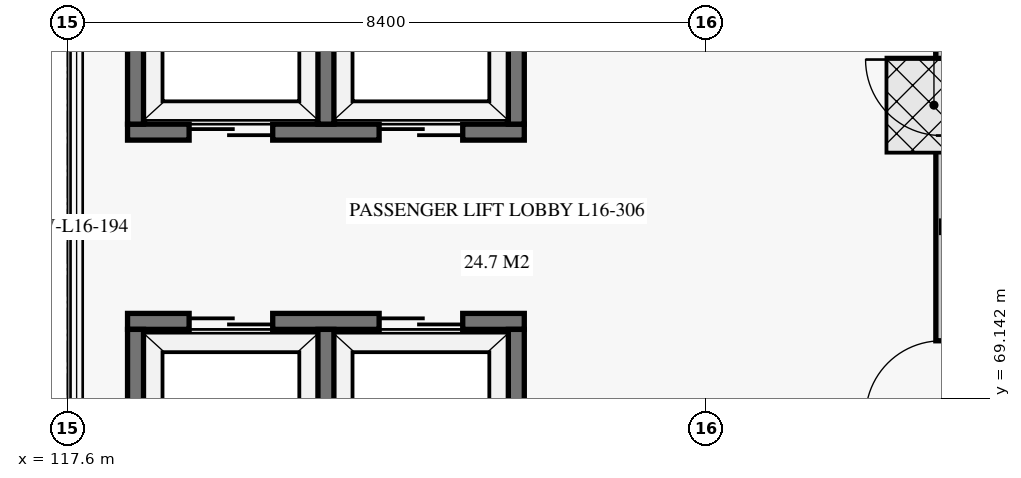
"""IFC4 building model, lengths in metres.
Left out: names, types, materials, properties, quantities, classifications, styles, units other than length and angle.
Written with IfcOpenShell. Run it as: python <this file> out.ifc"""

import sys

from ifc_helpers import new_model, si_unit, direction, frame, frame_2d, origin, origin_2d, place, context, subcontext, project, spatial, rectangle, extrude, element, fill, save


model = new_model("IFC4")
c1 = context("Model", 3, precision=1e-05, world=origin(), true_north=direction((0.0, 1.0)))
c2 = subcontext(c1, "Body", "Model", "MODEL_VIEW")
j1 = project(units=[si_unit("LENGTHUNIT", "METRE"), si_unit("PLANEANGLEUNIT", "RADIAN")], contexts=[c1])
p1 = place(None, origin())
s1 = spatial("IfcSite", under=j1, at=p1, CompositionType="ELEMENT")
p2 = place(p1, origin())
s2 = spatial("IfcBuilding", under=s1, at=p2, CompositionType="ELEMENT")
p3 = place(p2, frame((0.0, 0.0, 66.7)))
s3 = spatial("IfcBuildingStorey", under=s2, at=p3, CompositionType="ELEMENT", Elevation=66.7)
p4 = place(p3, frame((117.72, 67.366, 4.5), z_axis=(0.0, 0.0, 1.0), x_axis=(0.0, 1.0, 0.0)))
e1 = element("IfcWall", 1, at=p4, inside=s3, PredefinedType="SOLIDWALL", context=c2, shape_type="SweptSolid", body=[
    extrude(rectangle(XDim=8.104, YDim=0.23, at=frame_2d((4.052, 0.0))), origin(), (0.0, 0.0, 1.0), 3.15),
])
p5 = place(p3, frame((118.39, 70.155, 0.0), z_axis=(0.0, 0.0, 1.0), x_axis=(1.0, 0.0, 0.0)))
e2 = element("IfcWall", 2, at=p5, inside=s3, PredefinedType="SHEAR", context=c2, shape_type="SweptSolid", body=[
    extrude(rectangle(XDim=5.22, YDim=0.21, at=frame_2d((2.61, 0.0))), origin(), (0.0, 0.0, 1.0), 4.22),
])
p6 = place(p5, frame((0.81, 0.0, 0.0)))
e3 = element("IfcOpeningElement", 3, at=p6, cuts=e2, PredefinedType="OPENING", context=c2, shape_type="SweptSolid", body=[
    extrude(rectangle(XDim=1.1, YDim=2.15, at=frame_2d((0.55, 1.075))), frame((0.0, 0.115, 0.0), z_axis=(0.0, -1.0, 0.0), x_axis=(1.0, 0.0, 0.0)), (0.0, 0.0, 1.0), 0.23),
])
p7 = place(p5, frame((3.31, 0.0, 0.0)))
e4 = element("IfcOpeningElement", 4, at=p7, cuts=e2, PredefinedType="OPENING", context=c2, shape_type="SweptSolid", body=[
    extrude(rectangle(XDim=1.1, YDim=2.15, at=frame_2d((0.55, 1.075))), frame((0.0, 0.115, 0.0), z_axis=(0.0, -1.0, 0.0), x_axis=(1.0, 0.0, 0.0)), (0.0, 0.0, 1.0), 0.23),
])
for number, where, z_axis, x_axis in (
    (5, (118.495, 67.85, 0.0), (0.0, 0.0, 1.0), (0.0, 1.0, 0.0)),
    (6, (123.505, 67.85, 0.0), (0.0, 0.0, 1.0), (0.0, 1.0, 0.0)),
    (7, (121.0, 67.85, 0.0), (0.0, 0.0, 1.0), (0.0, 1.0, 0.0)),
):
    element("IfcWall", number, at=place(p3, frame(where, z_axis=z_axis, x_axis=x_axis)), inside=s3, PredefinedType="SHEAR", context=c2, shape_type="SweptSolid", body=[
        extrude(rectangle(XDim=2.2, YDim=0.21, at=frame_2d((1.1, 0.0))), origin(), (0.0, 0.0, 1.0), 4.22),
    ])
p8 = place(p3, frame((118.39, 72.645, 0.0), z_axis=(0.0, 0.0, 1.0), x_axis=(1.0, 0.0, 0.0)))
e8 = element("IfcWall", 8, at=p8, inside=s3, PredefinedType="SHEAR", context=c2, shape_type="SweptSolid", body=[
    extrude(rectangle(XDim=5.22, YDim=0.21, at=frame_2d((2.61, 0.0))), origin(), (0.0, 0.0, 1.0), 4.22),
])
p9 = place(p8, frame((0.81, 0.0, 0.0)))
e9 = element("IfcOpeningElement", 9, at=p9, cuts=e8, PredefinedType="OPENING", context=c2, shape_type="SweptSolid", body=[
    extrude(rectangle(XDim=1.1, YDim=2.15, at=frame_2d((0.55, 1.075))), frame((0.0, 0.115, 0.0), z_axis=(0.0, -1.0, 0.0), x_axis=(1.0, 0.0, 0.0)), (0.0, 0.0, 1.0), 0.23),
])
p10 = place(p8, frame((3.31, 0.0, 0.0)))
e10 = element("IfcOpeningElement", 10, at=p10, cuts=e8, PredefinedType="OPENING", context=c2, shape_type="SweptSolid", body=[
    extrude(rectangle(XDim=1.1, YDim=2.15, at=frame_2d((0.55, 1.075))), frame((0.0, 0.115, 0.0), z_axis=(0.0, -1.0, 0.0), x_axis=(1.0, 0.0, 0.0)), (0.0, 0.0, 1.0), 0.23),
])
for number, where, z_axis, x_axis in (
    (11, (118.495, 72.75, 0.0), (0.0, 0.0, 1.0), (0.0, 1.0, 0.0)),
    (12, (123.505, 72.75, 0.0), (0.0, 0.0, 1.0), (0.0, 1.0, 0.0)),
    (13, (121.0, 72.75, 0.0), (0.0, 0.0, 1.0), (0.0, 1.0, 0.0)),
):
    element("IfcWall", number, at=place(p3, frame(where, z_axis=z_axis, x_axis=x_axis)), inside=s3, PredefinedType="SHEAR", context=c2, shape_type="SweptSolid", body=[
        extrude(rectangle(XDim=2.2, YDim=0.21, at=frame_2d((1.1, 0.0))), origin(), (0.0, 0.0, 1.0), 4.22),
    ])
p11 = place(p3, frame((129.1, 67.7, 0.0), z_axis=(0.0, 0.0, 1.0), x_axis=(0.0, 1.0, 0.0)))
e14 = element("IfcWall", 14, at=p11, inside=s3, PredefinedType="PARTITIONING", context=c2, shape_type="SweptSolid", body=[
    extrude(rectangle(XDim=7.4, YDim=0.15, at=frame_2d((3.7, 0.0))), origin(), (0.0, 0.0, 1.0), 3.84),
])
p12 = place(p11, frame((1.2, 0.0, 0.0)))
e15 = element("IfcOpeningElement", 15, at=p12, cuts=e14, PredefinedType="OPENING", context=c2, shape_type="SweptSolid", body=[
    extrude(rectangle(XDim=1.0, YDim=2.1, at=frame_2d((0.5, 1.05))), frame((0.0, 0.085, 0.0), z_axis=(0.0, -1.0, 0.0), x_axis=(1.0, 0.0, 0.0)), (0.0, 0.0, 1.0), 0.17),
])
p13 = place(p11, frame((4.9, 0.0, 0.0)))
e16 = element("IfcOpeningElement", 16, at=p13, cuts=e14, PredefinedType="OPENING", context=c2, shape_type="SweptSolid", body=[
    extrude(rectangle(XDim=1.0, YDim=2.1, at=frame_2d((0.5, 1.05))), frame((0.0, 0.085, 0.0), z_axis=(0.0, -1.0, 0.0), x_axis=(1.0, 0.0, 0.0)), (0.0, 0.0, 1.0), 0.17),
])
p14 = place(p2, frame((0.0, 0.0, 74.78)))
p15 = place(p14, origin())
p16 = place(p15, frame((129.0, 73.0, 0.22)))
e17 = element("IfcDoor", 17, at=p16, inside=s3, OperationType="SINGLE_SWING_LEFT", PredefinedType="TRAPDOOR", context=c2, shape_type="SweptSolid", body=[
    extrude(rectangle(XDim=1.25, YDim=1.25, at=origin_2d()), origin(), (0.0, 0.0, 1.0), 0.05),
])
p17 = place(p6, origin())
e18 = element("IfcDoor", 18, at=p17, inside=s3, OperationType="DOUBLE_DOOR_SLIDING", PredefinedType="DOOR", context=c2, shape_type="SweptSolid", body=[
    extrude(rectangle(XDim=1.1, YDim=2.15, at=frame_2d((0.55, 1.075))), frame((0.0, 0.025, 0.0), z_axis=(0.0, -1.0, 0.0), x_axis=(1.0, 0.0, 0.0)), (0.0, 0.0, 1.0), 0.05),
])
fill(e3, e18)
p18 = place(p7, origin())
e19 = element("IfcDoor", 19, at=p18, inside=s3, OperationType="DOUBLE_DOOR_SLIDING", PredefinedType="DOOR", context=c2, shape_type="SweptSolid", body=[
    extrude(rectangle(XDim=1.1, YDim=2.15, at=frame_2d((0.55, 1.075))), frame((0.0, 0.025, 0.0), z_axis=(0.0, -1.0, 0.0), x_axis=(1.0, 0.0, 0.0)), (0.0, 0.0, 1.0), 0.05),
])
fill(e4, e19)
p19 = place(p9, origin())
e20 = element("IfcDoor", 20, at=p19, inside=s3, OperationType="DOUBLE_DOOR_SLIDING", PredefinedType="DOOR", context=c2, shape_type="SweptSolid", body=[
    extrude(rectangle(XDim=1.1, YDim=2.15, at=frame_2d((0.55, 1.075))), frame((0.0, 0.025, 0.0), z_axis=(0.0, -1.0, 0.0), x_axis=(1.0, 0.0, 0.0)), (0.0, 0.0, 1.0), 0.05),
])
fill(e9, e20)
p20 = place(p10, origin())
e21 = element("IfcDoor", 21, at=p20, inside=s3, OperationType="DOUBLE_DOOR_SLIDING", PredefinedType="DOOR", context=c2, shape_type="SweptSolid", body=[
    extrude(rectangle(XDim=1.1, YDim=2.15, at=frame_2d((0.55, 1.075))), frame((0.0, 0.025, 0.0), z_axis=(0.0, -1.0, 0.0), x_axis=(1.0, 0.0, 0.0)), (0.0, 0.0, 1.0), 0.05),
])
fill(e10, e21)
p21 = place(p12, origin())
e22 = element("IfcDoor", 22, at=p21, inside=s3, OperationType="SINGLE_SWING_LEFT", PredefinedType="DOOR", context=c2, shape_type="SweptSolid", body=[
    extrude(rectangle(XDim=1.0, YDim=2.1, at=frame_2d((0.5, 1.05))), frame((0.0, 0.025, 0.0), z_axis=(0.0, -1.0, 0.0), x_axis=(1.0, 0.0, 0.0)), (0.0, 0.0, 1.0), 0.05),
])
fill(e15, e22)
p22 = place(p13, origin())
e23 = element("IfcDoor", 23, at=p22, inside=s3, OperationType="SINGLE_SWING_RIGHT", PredefinedType="DOOR", context=c2, shape_type="SweptSolid", body=[
    extrude(rectangle(XDim=1.0, YDim=2.1, at=frame_2d((0.5, 1.05))), frame((0.0, 0.025, 0.0), z_axis=(0.0, -1.0, 0.0), x_axis=(1.0, 0.0, 0.0)), (0.0, 0.0, 1.0), 0.05),
])
fill(e16, e23)
save(model, sys.argv[1])
